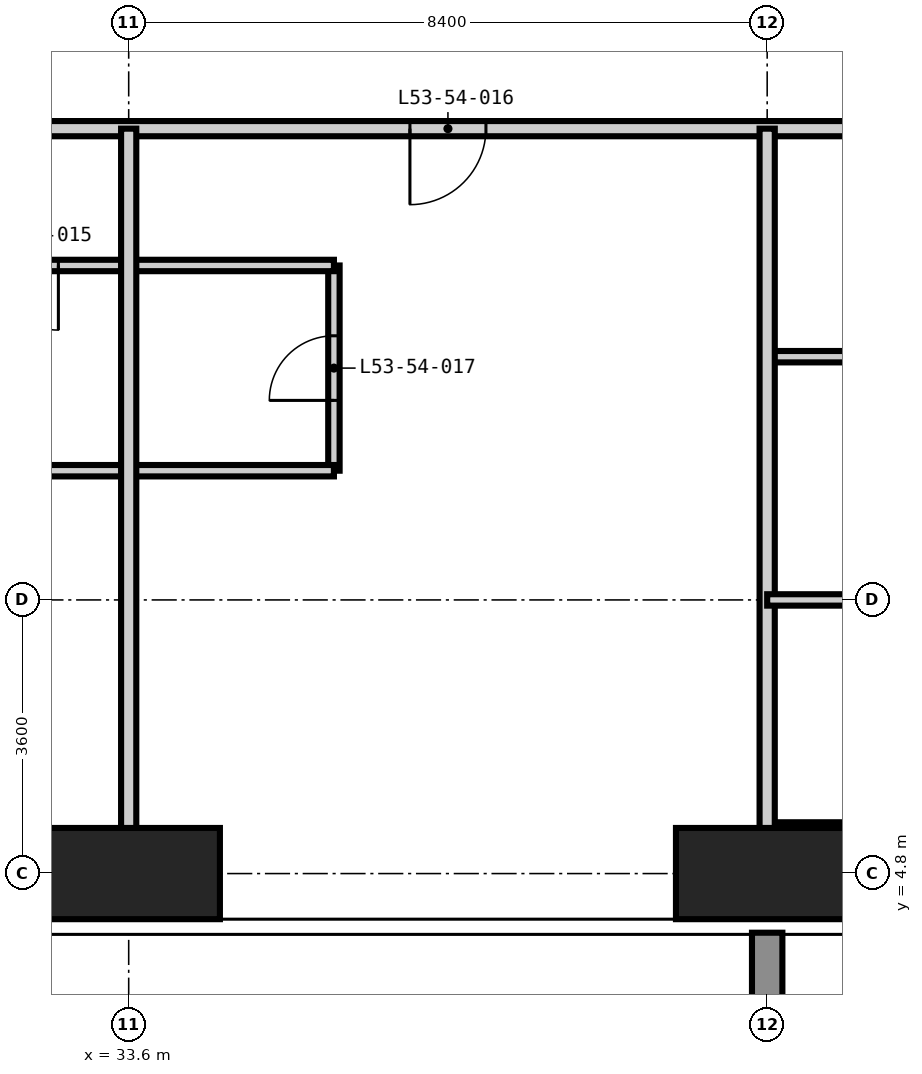
"""IFC4 building model, lengths in metres.
Left out: names, types, materials, properties, quantities, classifications, styles, units other than length and angle.
Written with IfcOpenShell. Run it as: python <this file> out.ifc"""

import sys

from ifc_helpers import new_model, si_unit, direction, frame, frame_2d, origin, origin_2d, place, context, subcontext, project, spatial, rectangle, extrude, element, fill, save


model = new_model("IFC4")
c1 = context("Model", 3, precision=1e-05, world=origin(), true_north=direction((0.0, 1.0)))
c2 = subcontext(c1, "Body", "Model", "MODEL_VIEW")
j1 = project(units=[si_unit("LENGTHUNIT", "METRE"), si_unit("PLANEANGLEUNIT", "RADIAN")], contexts=[c1])
p1 = place(None, origin())
s1 = spatial("IfcSite", under=j1, at=p1, CompositionType="ELEMENT")
p2 = place(p1, origin())
s2 = spatial("IfcBuilding", under=s1, at=p2, CompositionType="ELEMENT")
p3 = place(p2, frame((0.0, 0.0, 205.8)))
s3 = spatial("IfcBuildingStorey", under=s2, at=p3, CompositionType="ELEMENT", Elevation=205.8)
for number, where, z_axis, x_axis in (
    (1, (33.6, 4.8, -0.35), (0.0, 0.0, 1.0), (1.0, 0.0, 0.0)),
    (2, (42.0, 4.8, -0.35), (0.0, 0.0, 1.0), (1.0, 0.0, 0.0)),
):
    element("IfcColumn", number, at=place(p3, frame(where, z_axis=z_axis, x_axis=x_axis)), inside=s3, PredefinedType="COLUMN", context=c2, shape_type="SweptSolid", body=[
        extrude(rectangle(XDim=2.4, YDim=1.2, at=origin_2d()), origin(), (0.0, 0.0, 1.0), 3.6),
    ])
p4 = place(p3, frame((36.3, 10.1, 0.0), z_axis=(0.0, 0.0, 1.0), x_axis=(0.0, 1.0, 0.0)))
e3 = element("IfcWall", 3, at=p4, inside=s3, PredefinedType="PARTITIONING", context=c2, shape_type="SweptSolid", body=[
    extrude(rectangle(XDim=2.7, YDim=0.15, at=frame_2d((1.35, 0.0))), origin(), (0.0, 0.0, 1.0), 3.25),
])
p5 = place(p4, frame((0.925, 0.0, 0.0)))
e4 = element("IfcOpeningElement", 4, at=p5, cuts=e3, PredefinedType="OPENING", context=c2, shape_type="SweptSolid", body=[
    extrude(rectangle(XDim=0.85, YDim=2.1, at=frame_2d((0.425, 1.05))), frame((0.0, 0.085, 0.0), z_axis=(0.0, -1.0, 0.0), x_axis=(1.0, 0.0, 0.0)), (0.0, 0.0, 1.0), 0.17),
])
p6 = place(p3, frame((42.0, 5.4, 0.0), z_axis=(0.0, 0.0, 1.0), x_axis=(1.0, 0.0, 0.0)))
e5 = element("IfcWall", 5, at=p6, inside=s3, PredefinedType="PARTITIONING", context=c2, shape_type="SweptSolid", body=[
    extrude(rectangle(XDim=3.6, YDim=0.15, at=frame_2d((1.8, 0.0))), origin(), (0.0, 0.0, 1.0), 3.25),
])
p7 = place(p6, frame((1.375, 0.0, 0.0)))
e6 = element("IfcOpeningElement", 6, at=p7, cuts=e5, PredefinedType="OPENING", context=c2, shape_type="SweptSolid", body=[
    extrude(rectangle(XDim=0.85, YDim=2.1, at=frame_2d((0.425, 1.05))), frame((0.0, 0.085, 0.0), z_axis=(0.0, -1.0, 0.0), x_axis=(1.0, 0.0, 0.0)), (0.0, 0.0, 1.0), 0.17),
])
p8 = place(p3, frame((30.9, 10.1, 0.0), z_axis=(0.0, 0.0, 1.0), x_axis=(1.0, 0.0, 0.0)))
e7 = element("IfcWall", 7, at=p8, inside=s3, PredefinedType="PARTITIONING", context=c2, shape_type="SweptSolid", body=[
    extrude(rectangle(XDim=5.4, YDim=0.15, at=frame_2d((2.7, 0.0))), origin(), (0.0, 0.0, 1.0), 3.25),
])
p9 = place(p3, frame((42.0, 11.6, 0.0), z_axis=(0.0, 0.0, 1.0), x_axis=(1.0, 0.0, 0.0)))
e8 = element("IfcWall", 8, at=p9, inside=s3, PredefinedType="PARTITIONING", context=c2, shape_type="SweptSolid", body=[
    extrude(rectangle(XDim=2.8, YDim=0.15, at=frame_2d((1.4, 0.0))), origin(), (0.0, 0.0, 1.0), 3.25),
])
p10 = place(p3, frame((30.9, 12.8, 0.0), z_axis=(0.0, 0.0, 1.0), x_axis=(1.0, 0.0, 0.0)))
e9 = element("IfcWall", 9, at=p10, inside=s3, PredefinedType="PARTITIONING", context=c2, shape_type="SweptSolid", body=[
    extrude(rectangle(XDim=5.4, YDim=0.15, at=frame_2d((2.7, 0.0))), origin(), (0.0, 0.0, 1.0), 3.25),
])
p11 = place(p10, frame((0.925, 0.0, 0.0)))
e10 = element("IfcOpeningElement", 10, at=p11, cuts=e9, PredefinedType="OPENING", context=c2, shape_type="SweptSolid", body=[
    extrude(rectangle(XDim=0.85, YDim=2.1, at=frame_2d((0.425, 1.05))), frame((0.0, 0.085, 0.0), z_axis=(0.0, -1.0, 0.0), x_axis=(1.0, 0.0, 0.0)), (0.0, 0.0, 1.0), 0.17),
])
p12 = place(p3, frame((44.8, 14.6, 0.0), z_axis=(0.0, 0.0, 1.0), x_axis=(-1.0, 0.0, 0.0)))
e11 = element("IfcWall", 11, at=p12, inside=s3, PredefinedType="PARTITIONING", context=c2, shape_type="SweptSolid", body=[
    extrude(rectangle(XDim=30.2, YDim=0.2, at=frame_2d((15.1, 0.0))), origin(), (0.0, 0.0, 1.0), 3.25),
])
p13 = place(p12, frame((24.5, 0.0, 0.0)))
e12 = element("IfcOpeningElement", 12, at=p13, cuts=e11, PredefinedType="OPENING", context=c2, shape_type="SweptSolid", body=[
    extrude(rectangle(XDim=1.0, YDim=2.2, at=frame_2d((0.5, 1.1))), frame((0.0, 0.11, 0.0), z_axis=(0.0, -1.0, 0.0), x_axis=(1.0, 0.0, 0.0)), (0.0, 0.0, 1.0), 0.22),
])
p14 = place(p12, frame((12.8, 0.0, 0.0)))
e13 = element("IfcOpeningElement", 13, at=p14, cuts=e11, PredefinedType="OPENING", context=c2, shape_type="SweptSolid", body=[
    extrude(rectangle(XDim=1.0, YDim=2.2, at=frame_2d((0.5, 1.1))), frame((0.0, 0.11, 0.0), z_axis=(0.0, -1.0, 0.0), x_axis=(1.0, 0.0, 0.0)), (0.0, 0.0, 1.0), 0.22),
])
p15 = place(p12, frame((6.5, 0.0, 0.0)))
e14 = element("IfcOpeningElement", 14, at=p15, cuts=e11, PredefinedType="OPENING", context=c2, shape_type="SweptSolid", body=[
    extrude(rectangle(XDim=1.0, YDim=2.2, at=frame_2d((0.5, 1.1))), frame((0.0, 0.11, 0.0), z_axis=(0.0, -1.0, 0.0), x_axis=(1.0, 0.0, 0.0)), (0.0, 0.0, 1.0), 0.22),
])
for number, where, z_axis, x_axis in (
    (15, (33.6, 4.182, 0.0), (0.0, 0.0, 1.0), (0.0, 1.0, 0.0)),
    (16, (42.0, 4.182, 0.0), (0.0, 0.0, 1.0), (0.0, 1.0, 0.0)),
):
    element("IfcWall", number, at=place(p3, frame(where, z_axis=z_axis, x_axis=x_axis)), inside=s3, PredefinedType="PARTITIONING", context=c2, shape_type="SweptSolid", body=[
        extrude(rectangle(XDim=10.418, YDim=0.2, at=frame_2d((5.209, 0.0))), origin(), (0.0, 0.0, 1.0), 3.25),
    ])
p16 = place(p3, frame((42.0, 8.4, 0.0), z_axis=(0.0, 0.0, 1.0), x_axis=(1.0, 0.0, 0.0)))
e17 = element("IfcWall", 17, at=p16, inside=s3, PredefinedType="PARTITIONING", context=c2, shape_type="SweptSolid", body=[
    extrude(rectangle(XDim=12.618, YDim=0.15, at=frame_2d((6.309, 0.0))), origin(), (0.0, 0.0, 1.0), 3.25),
])
p17 = place(p16, frame((8.85, 0.0, 0.0)))
e18 = element("IfcOpeningElement", 18, at=p17, cuts=e17, PredefinedType="OPENING", context=c2, shape_type="SweptSolid", body=[
    extrude(rectangle(XDim=0.9, YDim=2.1, at=frame_2d((0.45, 1.05))), frame((0.0, 0.085, 0.0), z_axis=(0.0, -1.0, 0.0), x_axis=(1.0, 0.0, 0.0)), (0.0, 0.0, 1.0), 0.17),
])
p18 = place(p11, frame((0.85, 0.0, 0.0), z_axis=(0.0, 0.0, 1.0), x_axis=(-1.0, 0.0, 0.0)))
e19 = element("IfcDoor", 19, at=p18, inside=s3, OperationType="SINGLE_SWING_LEFT", PredefinedType="DOOR", context=c2, shape_type="SweptSolid", body=[
    extrude(rectangle(XDim=0.85, YDim=2.1, at=frame_2d((0.425, 1.05))), frame((0.0, 0.025, 0.0), z_axis=(0.0, -1.0, 0.0), x_axis=(1.0, 0.0, 0.0)), (0.0, 0.0, 1.0), 0.05),
])
fill(e10, e19)
p19 = place(p15, origin())
e20 = element("IfcDoor", 20, at=p19, inside=s3, OperationType="SINGLE_SWING_RIGHT", PredefinedType="DOOR", context=c2, shape_type="SweptSolid", body=[
    extrude(rectangle(XDim=1.0, YDim=2.2, at=frame_2d((0.5, 1.1))), frame((0.0, 0.025, 0.0), z_axis=(0.0, -1.0, 0.0), x_axis=(1.0, 0.0, 0.0)), (0.0, 0.0, 1.0), 0.05),
])
fill(e14, e20)
p20 = place(p5, origin())
e21 = element("IfcDoor", 21, at=p20, inside=s3, OperationType="SINGLE_SWING_LEFT", PredefinedType="DOOR", context=c2, shape_type="SweptSolid", body=[
    extrude(rectangle(XDim=0.85, YDim=2.1, at=frame_2d((0.425, 1.05))), frame((0.0, 0.025, 0.0), z_axis=(0.0, -1.0, 0.0), x_axis=(1.0, 0.0, 0.0)), (0.0, 0.0, 1.0), 0.05),
])
fill(e4, e21)
save(model, sys.argv[1])
